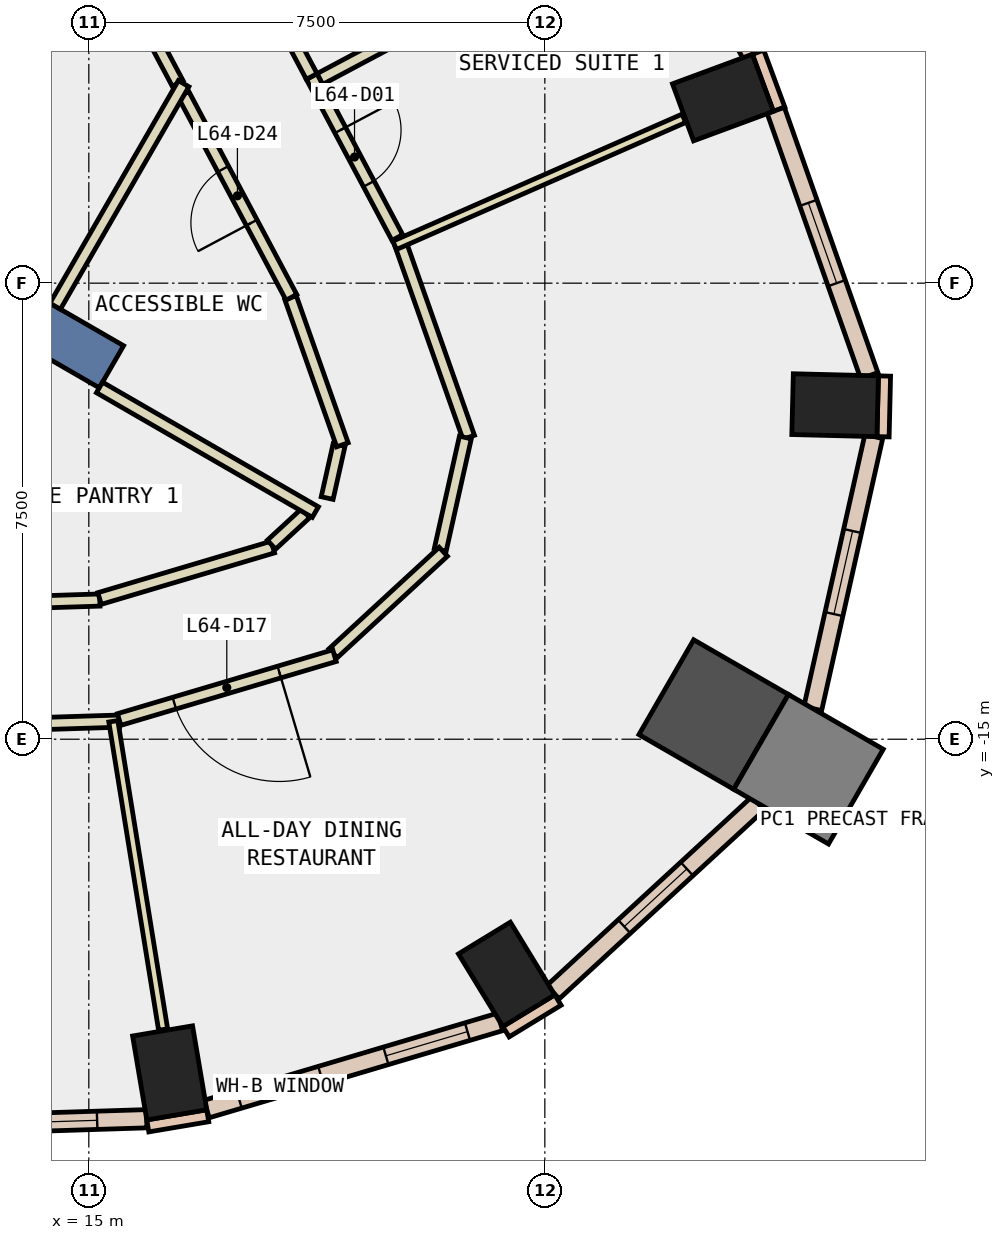
"""IFC4 building model, lengths in metres.
Left out: names, types, materials, properties, quantities, classifications, styles, units other than length and angle.
Written with IfcOpenShell. Run it as: python <this file> out.ifc"""

import sys

from ifc_helpers import new_model, si_unit, direction, frame, frame_2d, origin, origin_2d, place, context, subcontext, project, spatial, rectangle, extrude, element, fill, save


model = new_model("IFC4")
c1 = context("Model", 3, precision=1e-05, world=origin(), true_north=direction((0.0, 1.0)))
c2 = subcontext(c1, "Body", "Model", "MODEL_VIEW")
j1 = project(units=[si_unit("LENGTHUNIT", "METRE"), si_unit("PLANEANGLEUNIT", "RADIAN")], contexts=[c1])
p1 = place(None, origin())
s1 = spatial("IfcSite", under=j1, at=p1, CompositionType="ELEMENT")
p2 = place(p1, origin())
s2 = spatial("IfcBuilding", under=s1, at=p2, CompositionType="ELEMENT")
p3 = place(p2, frame((0.0, 0.0, 277.4)))
s3 = spatial("IfcBuildingStorey", under=s2, at=p3, CompositionType="ELEMENT", Elevation=277.4)
for number, where, z_axis, x_axis in (
    (1, (16.33, -20.487, -0.34), (0.0, 0.0, 1.0), (0.986, 0.167, 0.0)),
    (2, (21.871, -18.867, -0.34), (0.0, 0.0, 1.0), (0.853, 0.521, 0.0)),
):
    element("IfcColumn", number, at=place(p3, frame(where, z_axis=z_axis, x_axis=x_axis)), inside=s3, PredefinedType="COLUMN", context=c2, shape_type="SweptSolid", body=[
        extrude(rectangle(XDim=1.0, YDim=1.4, at=origin_2d()), origin(), (0.0, 0.0, 1.0), 3.34),
    ])
p4 = place(p3, frame((25.277, -14.594, -0.34), z_axis=(0.0, 0.0, 1.0), x_axis=(-0.866025403784, 0.5, 0.0)))
e3 = element("IfcColumn", 3, at=p4, inside=s3, PredefinedType="COLUMN", context=c2, shape_type="SweptSolid", body=[
    extrude(rectangle(XDim=1.8, YDim=1.8, at=origin_2d()), origin(), (0.0, 0.0, 1.0), 3.34),
])
for number, where, z_axis, x_axis in (
    (4, (27.274, -9.507, -0.34), (0.0, 0.0, 1.0), (0.025, 1.0, 0.0)),
    (5, (25.429, -4.448, -0.34), (0.0, 0.0, 1.0), (-0.347, 0.938, 0.0)),
):
    element("IfcColumn", number, at=place(p3, frame(where, z_axis=z_axis, x_axis=x_axis)), inside=s3, PredefinedType="COLUMN", context=c2, shape_type="SweptSolid", body=[
        extrude(rectangle(XDim=1.0, YDim=1.4, at=origin_2d()), origin(), (0.0, 0.0, 1.0), 3.34),
    ])
p5 = place(p3, frame((26.836, -15.494, -0.34), z_axis=(0.0, 0.0, 1.0), x_axis=(-0.866025403784, 0.5, 0.0)))
e6 = element("IfcColumn", 6, at=p5, inside=s3, PredefinedType="COLUMN", context=c2, shape_type="SweptSolid", body=[
    extrude(rectangle(XDim=1.8, YDim=1.8, at=origin_2d()), origin(), (0.0, 0.0, 1.0), 3.34),
])
p6 = place(p3, frame((7.578, -4.375, -0.34), z_axis=(0.0, 0.0, 1.0), x_axis=(0.866024315419, -0.5000018851, 0.0)))
e7 = element("IfcWall", 7, at=p6, inside=s3, PredefinedType="SHEAR", context=c2, shape_type="SweptSolid", body=[
    extrude(rectangle(XDim=9.0, YDim=0.8, at=frame_2d((4.5, 0.0))), origin(), (0.0, 0.0, 1.0), 3.34),
])
p7 = place(p3, frame((26.353, -4.64, 0.0), z_axis=(0.0, 0.0, 1.0), x_axis=(-0.346892928577, 0.937904737222, 0.0)))
e8 = element("IfcWall", 8, at=p7, inside=s3, PredefinedType="STANDARD", context=c2, shape_type="SweptSolid", body=[
    extrude(rectangle(XDim=1.0, YDim=0.2, at=frame_2d((0.5, 0.0))), origin(), (0.0, 0.0, 1.0), 3.0),
])
p8 = place(p3, frame((15.97, -21.359, 0.0), z_axis=(0.0, 0.0, 1.0), x_axis=(0.985961725342, 0.166971483074, 0.0)))
e9 = element("IfcWall", 9, at=p8, inside=s3, PredefinedType="STANDARD", context=c2, shape_type="SweptSolid", body=[
    extrude(rectangle(XDim=1.0, YDim=0.2, at=frame_2d((0.5, 0.0))), origin(), (0.0, 0.0, 1.0), 3.0),
])
p9 = place(p3, frame((21.861, -19.81, 0.0), z_axis=(0.0, 0.0, 1.0), x_axis=(0.853679739553, 0.520798331677, 0.0)))
e10 = element("IfcWall", 10, at=p9, inside=s3, PredefinedType="STANDARD", context=c2, shape_type="SweptSolid", body=[
    extrude(rectangle(XDim=1.0, YDim=0.2, at=frame_2d((0.5, 0.0))), origin(), (0.0, 0.0, 1.0), 3.0),
])
p10 = place(p3, frame((28.062, -10.026, 0.0), z_axis=(0.0, 0.0, 1.0), x_axis=(0.023948152966, 0.999713201858, 0.0)))
e11 = element("IfcWall", 11, at=p10, inside=s3, PredefinedType="STANDARD", context=c2, shape_type="SweptSolid", body=[
    extrude(rectangle(XDim=0.999, YDim=0.2, at=frame_2d((0.5, 0.0))), origin(), (0.0, 0.0, 1.0), 3.0),
])
p11 = place(p3, frame((8.296, -21.484, 0.0), z_axis=(0.0, 0.0, 1.0), x_axis=(0.999496876383, 0.031717410046, 0.0)))
e12 = element("IfcWall", 12, at=p11, inside=s3, PredefinedType="STANDARD", context=c2, shape_type="SweptSolid", body=[
    extrude(rectangle(XDim=7.659, YDim=0.3, at=frame_2d((3.83, 0.0))), origin(), (0.0, 0.0, 1.0), 3.0),
])
p12 = place(p11, frame((0.815, 0.0, 0.9)))
e13 = element("IfcOpeningElement", 13, at=p12, cuts=e12, PredefinedType="OPENING", context=c2, shape_type="SweptSolid", body=[
    extrude(rectangle(XDim=2.2, YDim=2.0, at=frame_2d((1.1, 1.0))), frame((0.0, 0.16, 0.0), z_axis=(0.0, -1.0, 0.0), x_axis=(1.0, 0.0, 0.0)), (0.0, 0.0, 1.0), 0.32),
])
p13 = place(p11, frame((4.644, 0.0, 0.9)))
e14 = element("IfcOpeningElement", 14, at=p13, cuts=e12, PredefinedType="OPENING", context=c2, shape_type="SweptSolid", body=[
    extrude(rectangle(XDim=2.2, YDim=2.0, at=frame_2d((1.1, 1.0))), frame((0.0, 0.16, 0.0), z_axis=(0.0, -1.0, 0.0), x_axis=(1.0, 0.0, 0.0)), (0.0, 0.0, 1.0), 0.32),
])
p14 = place(p3, frame((16.937, -21.082, 0.0), z_axis=(0.0, 0.0, 1.0), x_axis=(0.95864045837, 0.284619872067, 0.0)))
e15 = element("IfcWall", 15, at=p14, inside=s3, PredefinedType="STANDARD", context=c2, shape_type="SweptSolid", body=[
    extrude(rectangle(XDim=5.035, YDim=0.3, at=frame_2d((2.518, 0.0))), origin(), (0.0, 0.0, 1.0), 3.0),
])
p15 = place(p14, frame((0.559, 0.0, 0.9)))
e16 = element("IfcOpeningElement", 16, at=p15, cuts=e15, PredefinedType="OPENING", context=c2, shape_type="SweptSolid", body=[
    extrude(rectangle(XDim=1.4, YDim=2.0, at=frame_2d((0.7, 1.0))), frame((0.0, 0.16, 0.0), z_axis=(0.0, -1.0, 0.0), x_axis=(1.0, 0.0, 0.0)), (0.0, 0.0, 1.0), 0.32),
])
p16 = place(p14, frame((3.076, 0.0, 0.9)))
e17 = element("IfcOpeningElement", 17, at=p16, cuts=e15, PredefinedType="OPENING", context=c2, shape_type="SweptSolid", body=[
    extrude(rectangle(XDim=1.4, YDim=2.0, at=frame_2d((0.7, 1.0))), frame((0.0, 0.16, 0.0), z_axis=(0.0, -1.0, 0.0), x_axis=(1.0, 0.0, 0.0)), (0.0, 0.0, 1.0), 0.32),
])
p17 = place(p3, frame((22.634, -19.16, 0.0), z_axis=(0.0, 0.0, 1.0), x_axis=(0.735631679486, 0.677381747714, 0.0)))
e18 = element("IfcWall", 18, at=p17, inside=s3, PredefinedType="STANDARD", context=c2, shape_type="SweptSolid", body=[
    extrude(rectangle(XDim=4.585, YDim=0.3, at=frame_2d((2.292, 0.0))), origin(), (0.0, 0.0, 1.0), 3.0),
])
p18 = place(p17, frame((1.593, 0.0, 0.9)))
e19 = element("IfcOpeningElement", 19, at=p18, cuts=e18, PredefinedType="OPENING", context=c2, shape_type="SweptSolid", body=[
    extrude(rectangle(XDim=1.4, YDim=2.0, at=frame_2d((0.7, 1.0))), frame((0.0, 0.16, 0.0), z_axis=(0.0, -1.0, 0.0), x_axis=(1.0, 0.0, 0.0)), (0.0, 0.0, 1.0), 0.32),
])
p19 = place(p3, frame((26.906, -14.496, 0.0), z_axis=(0.0, 0.0, 1.0), x_axis=(0.218936963279, 0.975739005119, 0.0)))
e20 = element("IfcWall", 20, at=p19, inside=s3, PredefinedType="STANDARD", context=c2, shape_type="SweptSolid", body=[
    extrude(rectangle(XDim=4.585, YDim=0.3, at=frame_2d((2.293, 0.0))), origin(), (0.0, 0.0, 1.0), 3.0),
])
p20 = place(p19, frame((1.593, 0.0, 0.9)))
e21 = element("IfcOpeningElement", 21, at=p20, cuts=e20, PredefinedType="OPENING", context=c2, shape_type="SweptSolid", body=[
    extrude(rectangle(XDim=1.4, YDim=2.0, at=frame_2d((0.7, 1.0))), frame((0.0, 0.16, 0.0), z_axis=(0.0, -1.0, 0.0), x_axis=(1.0, 0.0, 0.0)), (0.0, 0.0, 1.0), 0.32),
])
p21 = place(p3, frame((27.836, -9.021, 0.0), z_axis=(0.0, 0.0, 1.0), x_axis=(-0.332491532378, 0.943106240514, 0.0)))
e22 = element("IfcWall", 22, at=p21, inside=s3, PredefinedType="STANDARD", context=c2, shape_type="SweptSolid", body=[
    extrude(rectangle(XDim=4.625, YDim=0.3, at=frame_2d((2.312, 0.0))), origin(), (0.0, 0.0, 1.0), 3.0),
])
p22 = place(p21, frame((1.613, 0.0, 0.9)))
e23 = element("IfcOpeningElement", 23, at=p22, cuts=e22, PredefinedType="OPENING", context=c2, shape_type="SweptSolid", body=[
    extrude(rectangle(XDim=1.4, YDim=2.0, at=frame_2d((0.7, 1.0))), frame((0.0, 0.16, 0.0), z_axis=(0.0, -1.0, 0.0), x_axis=(1.0, 0.0, 0.0)), (0.0, 0.0, 1.0), 0.32),
])
p23 = place(p3, frame((25.895, -3.744, 0.0), z_axis=(0.0, 0.0, 1.0), x_axis=(-0.469691596427, 0.882830563724, 0.0)))
e24 = element("IfcWall", 24, at=p23, inside=s3, PredefinedType="STANDARD", context=c2, shape_type="SweptSolid", body=[
    extrude(rectangle(XDim=5.768, YDim=0.3, at=frame_2d((2.884, 0.0))), origin(), (0.0, 0.0, 1.0), 3.0),
])
p24 = place(p23, frame((0.492, 0.0, 0.9)))
e25 = element("IfcOpeningElement", 25, at=p24, cuts=e24, PredefinedType="OPENING", context=c2, shape_type="SweptSolid", body=[
    extrude(rectangle(XDim=1.9, YDim=2.0, at=frame_2d((0.95, 1.0))), frame((0.0, 0.16, 0.0), z_axis=(0.0, -1.0, 0.0), x_axis=(1.0, 0.0, 0.0)), (0.0, 0.0, 1.0), 0.32),
])
p25 = place(p23, frame((3.376, 0.0, 0.9)))
e26 = element("IfcOpeningElement", 26, at=p25, cuts=e24, PredefinedType="OPENING", context=c2, shape_type="SweptSolid", body=[
    extrude(rectangle(XDim=1.9, YDim=2.0, at=frame_2d((0.95, 1.0))), frame((0.0, 0.16, 0.0), z_axis=(0.0, -1.0, 0.0), x_axis=(1.0, 0.0, 0.0)), (0.0, 0.0, 1.0), 0.32),
])
p26 = place(p3, frame((16.462, -4.217, 0.0), z_axis=(0.0, 0.0, 1.0), x_axis=(-0.469436447461, 0.882966263113, 0.0)))
e27 = element("IfcWall", 27, at=p26, inside=s3, PredefinedType="PARTITIONING", context=c2, shape_type="SweptSolid", body=[
    extrude(rectangle(XDim=2.179, YDim=0.2, at=frame_2d((1.09, 0.0))), origin(), (0.0, 0.0, 1.0), 3.0),
])
p27 = place(p3, frame((11.665, -12.823, 0.0), z_axis=(0.0, 0.0, 1.0), x_axis=(0.99949244941, 0.03185660956, 0.0)))
e28 = element("IfcWall", 28, at=p27, inside=s3, PredefinedType="PARTITIONING", context=c2, shape_type="SweptSolid", body=[
    extrude(rectangle(XDim=3.518, YDim=0.2, at=frame_2d((1.759, 0.0))), origin(), (0.0, 0.0, 1.0), 3.0),
])
p28 = place(p27, frame((1.259, 0.0, 0.0)))
e29 = element("IfcOpeningElement", 29, at=p28, cuts=e28, PredefinedType="OPENING", context=c2, shape_type="SweptSolid", body=[
    extrude(rectangle(XDim=1.0, YDim=2.1, at=frame_2d((0.5, 1.05))), frame((0.0, 0.11, 0.0), z_axis=(0.0, -1.0, 0.0), x_axis=(1.0, 0.0, 0.0)), (0.0, 0.0, 1.0), 0.22),
])
p29 = place(p3, frame((15.177, -12.686, 0.0), z_axis=(0.0, 0.0, 1.0), x_axis=(0.958629704259, 0.284656090947, 0.0)))
e30 = element("IfcWall", 30, at=p29, inside=s3, PredefinedType="PARTITIONING", context=c2, shape_type="SweptSolid", body=[
    extrude(rectangle(XDim=2.972, YDim=0.2, at=frame_2d((1.486, 0.0))), origin(), (0.0, 0.0, 1.0), 3.0),
])
p30 = place(p3, frame((18.004, -11.801, 0.0), z_axis=(0.0, 0.0, 1.0), x_axis=(0.735268601872, 0.677775835436, 0.0)))
e31 = element("IfcWall", 31, at=p30, inside=s3, PredefinedType="PARTITIONING", context=c2, shape_type="SweptSolid", body=[
    extrude(rectangle(XDim=0.764, YDim=0.2, at=frame_2d((0.382, 0.0))), origin(), (0.0, 0.0, 1.0), 3.0),
])
p31 = place(p3, frame((18.92, -11.034, 0.0), z_axis=(0.0, 0.0, 1.0), x_axis=(0.219096654714, 0.975703159723, 0.0)))
e32 = element("IfcWall", 32, at=p31, inside=s3, PredefinedType="PARTITIONING", context=c2, shape_type="SweptSolid", body=[
    extrude(rectangle(XDim=0.895, YDim=0.2, at=frame_2d((0.447, 0.0))), origin(), (0.0, 0.0, 1.0), 3.0),
])
p32 = place(p3, frame((19.171, -10.158, 0.0), z_axis=(0.0, 0.0, 1.0), x_axis=(-0.332486504777, 0.943108012977, 0.0)))
e33 = element("IfcWall", 33, at=p32, inside=s3, PredefinedType="PARTITIONING", context=c2, shape_type="SweptSolid", body=[
    extrude(rectangle(XDim=2.565, YDim=0.2, at=frame_2d((1.282, 0.0))), origin(), (0.0, 0.0, 1.0), 3.0),
])
p33 = place(p3, frame((18.332, -7.733, 0.0), z_axis=(0.0, 0.0, 1.0), x_axis=(-0.469639737924, 0.882858152006, 0.0)))
e34 = element("IfcWall", 34, at=p33, inside=s3, PredefinedType="PARTITIONING", context=c2, shape_type="SweptSolid", body=[
    extrude(rectangle(XDim=3.782, YDim=0.2, at=frame_2d((1.891, 0.0))), origin(), (0.0, 0.0, 1.0), 3.0),
])
p34 = place(p33, frame((1.391, 0.0, 0.0)))
e35 = element("IfcOpeningElement", 35, at=p34, cuts=e34, PredefinedType="OPENING", context=c2, shape_type="SweptSolid", body=[
    extrude(rectangle(XDim=1.0, YDim=2.1, at=frame_2d((0.5, 1.05))), frame((0.0, 0.11, 0.0), z_axis=(0.0, -1.0, 0.0), x_axis=(1.0, 0.0, 0.0)), (0.0, 0.0, 1.0), 0.22),
])
p35 = place(p3, frame((15.503, -14.702, 0.0), z_axis=(0.0, 0.0, 1.0), x_axis=(-0.999495120537, -0.031772693047, 0.0)))
e36 = element("IfcWall", 36, at=p35, inside=s3, PredefinedType="PARTITIONING", context=c2, shape_type="SweptSolid", body=[
    extrude(rectangle(XDim=7.807, YDim=0.2, at=frame_2d((3.903, 0.0))), origin(), (0.0, 0.0, 1.0), 3.0),
])
p36 = place(p35, frame((3.403, 0.0, 0.0)))
e37 = element("IfcOpeningElement", 37, at=p36, cuts=e36, PredefinedType="OPENING", context=c2, shape_type="SweptSolid", body=[
    extrude(rectangle(XDim=1.0, YDim=2.1, at=frame_2d((0.5, 1.05))), frame((0.0, 0.11, 0.0), z_axis=(0.0, -1.0, 0.0), x_axis=(1.0, 0.0, 0.0)), (0.0, 0.0, 1.0), 0.22),
])
p37 = place(p3, frame((20.113, -6.814, 0.0), z_axis=(0.0, 0.0, 1.0), x_axis=(0.332352648366, -0.943155192492, 0.0)))
e38 = element("IfcWall", 38, at=p37, inside=s3, PredefinedType="PARTITIONING", context=c2, shape_type="SweptSolid", body=[
    extrude(rectangle(XDim=3.415, YDim=0.2, at=frame_2d((1.708, 0.0))), origin(), (0.0, 0.0, 1.0), 3.0),
])
p38 = place(p3, frame((21.193, -10.038, 0.0), z_axis=(0.0, 0.0, 1.0), x_axis=(-0.218540107266, -0.975827967173, 0.0)))
e39 = element("IfcWall", 39, at=p38, inside=s3, PredefinedType="PARTITIONING", context=c2, shape_type="SweptSolid", body=[
    extrude(rectangle(XDim=1.895, YDim=0.2, at=frame_2d((0.947, 0.0))), origin(), (0.0, 0.0, 1.0), 3.0),
])
p39 = place(p3, frame((20.83, -11.917, 0.0), z_axis=(0.0, 0.0, 1.0), x_axis=(-0.735547704352, -0.67747293276, 0.0)))
e40 = element("IfcWall", 40, at=p39, inside=s3, PredefinedType="PARTITIONING", context=c2, shape_type="SweptSolid", body=[
    extrude(rectangle(XDim=2.463, YDim=0.2, at=frame_2d((1.232, 0.0))), origin(), (0.0, 0.0, 1.0), 3.0),
])
p40 = place(p3, frame((19.04, -13.626, 0.0), z_axis=(0.0, 0.0, 1.0), x_axis=(-0.958734738219, -0.284302131073, 0.0)))
e41 = element("IfcWall", 41, at=p40, inside=s3, PredefinedType="PARTITIONING", context=c2, shape_type="SweptSolid", body=[
    extrude(rectangle(XDim=3.693, YDim=0.2, at=frame_2d((1.847, 0.0))), origin(), (0.0, 0.0, 1.0), 3.0),
])
p41 = place(p40, frame((0.947, 0.0, 0.0)))
e42 = element("IfcOpeningElement", 42, at=p41, cuts=e41, PredefinedType="OPENING", context=c2, shape_type="SweptSolid", body=[
    extrude(rectangle(XDim=1.8, YDim=2.1, at=frame_2d((0.9, 1.05))), frame((0.0, 0.11, 0.0), z_axis=(0.0, -1.0, 0.0), x_axis=(1.0, 0.0, 0.0)), (0.0, 0.0, 1.0), 0.22),
])
p42 = place(p3, frame((18.666, -4.101, 0.0), z_axis=(0.0, 0.0, 1.0), x_axis=(0.469341661158, -0.883016650523, 0.0)))
e43 = element("IfcWall", 43, at=p42, inside=s3, PredefinedType="PARTITIONING", context=c2, shape_type="SweptSolid", body=[
    extrude(rectangle(XDim=3.0, YDim=0.2, at=frame_2d((1.5, 0.0))), origin(), (0.0, 0.0, 1.0), 3.0),
])
p43 = place(p42, frame((1.0, 0.0, 0.0)))
e44 = element("IfcOpeningElement", 44, at=p43, cuts=e43, PredefinedType="OPENING", context=c2, shape_type="SweptSolid", body=[
    extrude(rectangle(XDim=1.0, YDim=2.1, at=frame_2d((0.5, 1.05))), frame((0.0, 0.11, 0.0), z_axis=(0.0, -1.0, 0.0), x_axis=(1.0, 0.0, 0.0)), (0.0, 0.0, 1.0), 0.22),
])
p44 = place(p3, frame((17.257, -1.452, 0.0), z_axis=(0.0, 0.0, 1.0), x_axis=(0.469561695117, -0.882899662747, 0.0)))
e45 = element("IfcWall", 45, at=p44, inside=s3, PredefinedType="PARTITIONING", context=c2, shape_type="SweptSolid", body=[
    extrude(rectangle(XDim=3.0, YDim=0.2, at=frame_2d((1.5, 0.0))), origin(), (0.0, 0.0, 1.0), 3.0),
])
p45 = place(p3, frame((16.559, -4.219, 0.0), z_axis=(0.0, 0.0, 1.0), x_axis=(-0.499997491977, -0.866026851788, 0.0)))
e46 = element("IfcWall", 46, at=p45, inside=s3, PredefinedType="PARTITIONING", context=c2, shape_type="SweptSolid", body=[
    extrude(rectangle(XDim=4.226, YDim=0.2, at=frame_2d((2.113, 0.0))), origin(), (0.0, 0.0, 1.0), 3.0),
])
p46 = place(p3, frame((15.176, -9.215, 0.0), z_axis=(0.0, 0.0, 1.0), x_axis=(0.866006068523, -0.500033488159, 0.0)))
e47 = element("IfcWall", 47, at=p46, inside=s3, PredefinedType="PARTITIONING", context=c2, shape_type="SweptSolid", body=[
    extrude(rectangle(XDim=4.099, YDim=0.2, at=frame_2d((2.05, 0.0))), origin(), (0.0, 0.0, 1.0), 3.0),
])
p47 = place(p3, frame((15.403, -14.705, 0.0), z_axis=(0.0, 0.0, 1.0), x_axis=(0.159447664828, -0.98720638277, 0.0)))
e48 = element("IfcWall", 48, at=p47, inside=s3, PredefinedType="PARTITIONING", context=c2, shape_type="SweptSolid", body=[
    extrude(rectangle(XDim=5.135, YDim=0.15, at=frame_2d((2.568, 0.0))), origin(), (0.0, 0.0, 1.0), 3.0),
])
p48 = place(p3, frame((20.03, -6.878, 0.0), z_axis=(0.0, 0.0, 1.0), x_axis=(0.915616185053, 0.402053481104, 0.0)))
e49 = element("IfcWall", 49, at=p48, inside=s3, PredefinedType="PARTITIONING", context=c2, shape_type="SweptSolid", body=[
    extrude(rectangle(XDim=5.196, YDim=0.15, at=frame_2d((2.598, 0.0))), origin(), (0.0, 0.0, 1.0), 3.0),
])
p49 = place(p3, frame((18.801, -4.142, 0.0), z_axis=(0.0, 0.0, 1.0), x_axis=(0.882850852072, 0.469653460539, 0.0)))
e50 = element("IfcWall", 50, at=p49, inside=s3, PredefinedType="PARTITIONING", context=c2, shape_type="SweptSolid", body=[
    extrude(rectangle(XDim=2.4, YDim=0.2, at=frame_2d((1.2, 0.0))), origin(), (0.0, 0.0, 1.0), 3.0),
])
p50 = place(p13, origin())
e51 = element("IfcWindow", 51, at=p50, inside=s3, PartitioningType="SINGLE_PANEL", PredefinedType="WINDOW", context=c2, shape_type="SweptSolid", body=[
    extrude(rectangle(XDim=2.2, YDim=2.0, at=frame_2d((1.1, 1.0))), frame((0.0, 0.03, 0.0), z_axis=(0.0, -1.0, 0.0), x_axis=(1.0, 0.0, 0.0)), (0.0, 0.0, 1.0), 0.06),
])
fill(e14, e51)
p51 = place(p15, origin())
e52 = element("IfcWindow", 52, at=p51, inside=s3, PartitioningType="SINGLE_PANEL", PredefinedType="WINDOW", context=c2, shape_type="SweptSolid", body=[
    extrude(rectangle(XDim=1.4, YDim=2.0, at=frame_2d((0.7, 1.0))), frame((0.0, 0.03, 0.0), z_axis=(0.0, -1.0, 0.0), x_axis=(1.0, 0.0, 0.0)), (0.0, 0.0, 1.0), 0.06),
])
fill(e16, e52)
p52 = place(p16, origin())
e53 = element("IfcWindow", 53, at=p52, inside=s3, PartitioningType="SINGLE_PANEL", PredefinedType="WINDOW", context=c2, shape_type="SweptSolid", body=[
    extrude(rectangle(XDim=1.4, YDim=2.0, at=frame_2d((0.7, 1.0))), frame((0.0, 0.03, 0.0), z_axis=(0.0, -1.0, 0.0), x_axis=(1.0, 0.0, 0.0)), (0.0, 0.0, 1.0), 0.06),
])
fill(e17, e53)
p53 = place(p18, origin())
e54 = element("IfcWindow", 54, at=p53, inside=s3, PartitioningType="SINGLE_PANEL", PredefinedType="WINDOW", context=c2, shape_type="SweptSolid", body=[
    extrude(rectangle(XDim=1.4, YDim=2.0, at=frame_2d((0.7, 1.0))), frame((0.0, 0.03, 0.0), z_axis=(0.0, -1.0, 0.0), x_axis=(1.0, 0.0, 0.0)), (0.0, 0.0, 1.0), 0.06),
])
fill(e19, e54)
p54 = place(p20, origin())
e55 = element("IfcWindow", 55, at=p54, inside=s3, PartitioningType="SINGLE_PANEL", PredefinedType="WINDOW", context=c2, shape_type="SweptSolid", body=[
    extrude(rectangle(XDim=1.4, YDim=2.0, at=frame_2d((0.7, 1.0))), frame((0.0, 0.03, 0.0), z_axis=(0.0, -1.0, 0.0), x_axis=(1.0, 0.0, 0.0)), (0.0, 0.0, 1.0), 0.06),
])
fill(e21, e55)
p55 = place(p22, origin())
e56 = element("IfcWindow", 56, at=p55, inside=s3, PartitioningType="SINGLE_PANEL", PredefinedType="WINDOW", context=c2, shape_type="SweptSolid", body=[
    extrude(rectangle(XDim=1.4, YDim=2.0, at=frame_2d((0.7, 1.0))), frame((0.0, 0.03, 0.0), z_axis=(0.0, -1.0, 0.0), x_axis=(1.0, 0.0, 0.0)), (0.0, 0.0, 1.0), 0.06),
])
fill(e23, e56)
p56 = place(p43, origin())
e57 = element("IfcDoor", 57, at=p56, inside=s3, OperationType="SINGLE_SWING_LEFT", PredefinedType="DOOR", context=c2, shape_type="SweptSolid", body=[
    extrude(rectangle(XDim=1.0, YDim=2.1, at=frame_2d((0.5, 1.05))), frame((0.0, 0.025, 0.0), z_axis=(0.0, -1.0, 0.0), x_axis=(1.0, 0.0, 0.0)), (0.0, 0.0, 1.0), 0.05),
])
fill(e44, e57)
p57 = place(p41, origin())
e58 = element("IfcDoor", 58, at=p57, inside=s3, OperationType="DOUBLE_DOOR_SINGLE_SWING", PredefinedType="DOOR", context=c2, shape_type="SweptSolid", body=[
    extrude(rectangle(XDim=1.8, YDim=2.1, at=frame_2d((0.9, 1.05))), frame((0.0, 0.025, 0.0), z_axis=(0.0, -1.0, 0.0), x_axis=(1.0, 0.0, 0.0)), (0.0, 0.0, 1.0), 0.05),
])
fill(e42, e58)
p58 = place(p34, origin())
e59 = element("IfcDoor", 59, at=p58, inside=s3, OperationType="SINGLE_SWING_RIGHT", PredefinedType="DOOR", context=c2, shape_type="SweptSolid", body=[
    extrude(rectangle(XDim=1.0, YDim=2.1, at=frame_2d((0.5, 1.05))), frame((0.0, 0.025, 0.0), z_axis=(0.0, -1.0, 0.0), x_axis=(1.0, 0.0, 0.0)), (0.0, 0.0, 1.0), 0.05),
])
fill(e35, e59)
save(model, sys.argv[1])
